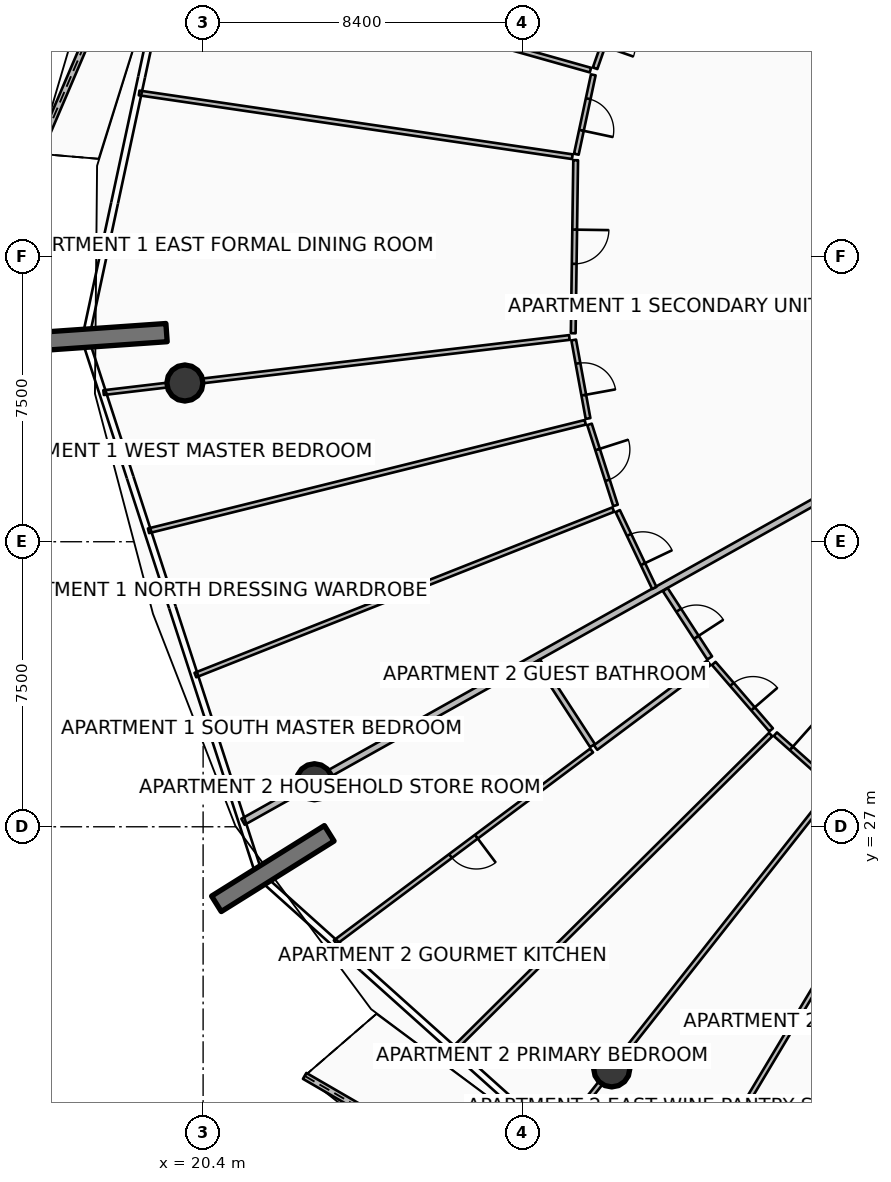
"""IFC4 building model, lengths in metres.
Left out: names, types, materials, properties, quantities, classifications, styles, units other than length and angle.
Written with IfcOpenShell. Run it as: python <this file> out.ifc"""

import sys

from ifc_helpers import new_model, si_unit, direction, frame, frame_2d, origin, origin_2d, place, context, subcontext, project, spatial, polyline, rectangle, circle, outline, extrude, element, fill, save


model = new_model("IFC4")
c1 = context("Model", 3, precision=1e-05, world=origin(), true_north=direction((0.0, 1.0)))
c2 = subcontext(c1, "Body", "Model", "MODEL_VIEW")
j1 = project(units=[si_unit("LENGTHUNIT", "METRE"), si_unit("PLANEANGLEUNIT", "RADIAN")], contexts=[c1])
p1 = place(None, origin())
s1 = spatial("IfcSite", under=j1, at=p1, CompositionType="ELEMENT")
p2 = place(p1, origin())
s2 = spatial("IfcBuilding", under=s1, at=p2, CompositionType="ELEMENT")
p3 = place(p2, frame((0.0, 0.0, 244.4)))
s3 = spatial("IfcBuildingStorey", under=s2, at=p3, CompositionType="ELEMENT", Elevation=244.4)
p4 = place(p3, frame((19.438, 40.003, 0.0), z_axis=(0.0, 0.0, 1.0), x_axis=(-0.997563824095, -0.069759707979, 0.0)))
e1 = element("IfcWall", 1, at=p4, inside=s3, PredefinedType="SOLIDWALL", context=c2, shape_type="SweptSolid", body=[
    extrude(rectangle(XDim=3.5, YDim=0.48, at=frame_2d((1.75, 0.0))), origin(), (0.0, 0.0, 1.0), 3.85),
])
p5 = place(p3, frame((23.719, 26.827, 0.0), z_axis=(0.0, 0.0, 1.0), x_axis=(-0.848033572426, -0.529942506352, 0.0)))
e2 = element("IfcWall", 2, at=p5, inside=s3, PredefinedType="SOLIDWALL", context=c2, shape_type="SweptSolid", body=[
    extrude(rectangle(XDim=3.5, YDim=0.48, at=frame_2d((1.75, 0.0))), origin(), (0.0, 0.0, 1.0), 3.85),
])
for number, where, z_axis, x_axis in (
    (3, (19.92, 38.677, 0.0), (0.0, 0.0, 1.0), (1.0, 0.0, 0.0)),
    (4, (23.33, 28.184, 0.0), (0.0, 0.0, 1.0), (1.0, 0.0, 0.0)),
    (5, (31.153, 20.629, 0.0), (0.0, 0.0, 1.0), (1.0, 0.0, 0.0)),
):
    element("IfcColumn", number, at=place(p3, frame(where, z_axis=z_axis, x_axis=x_axis)), inside=s3, PredefinedType="COLUMN", context=c2, shape_type="SweptSolid", body=[
        extrude(circle(Radius=0.475, at=origin_2d()), origin(), (0.0, 0.0, 1.0), 3.59),
    ])
p6 = place(p3, frame((20.765, 55.742, 0.0), z_axis=(0.0, 0.0, 1.0), x_axis=(-0.392715313702, -0.919660090677, 0.0)))
e6 = element("IfcWall", 6, at=p6, inside=s3, PredefinedType="PARAPET", context=c2, shape_type="SweptSolid", body=[
    extrude(outline(polyline([(0.0, 0.0), (11.995, 0.0), (11.995, 1.12), (5.998, 1.182), (0.0, 1.348), (0.0, 0.0)])), frame((0.0, 0.09, 0.0), z_axis=(0.0, -1.0, 0.0), x_axis=(1.0, 0.0, 0.0)), (0.0, 0.0, 1.0), 0.18),
])
p7 = place(p3, frame((23.073, 20.445, 0.0), z_axis=(0.0, 0.0, 1.0), x_axis=(0.865262565506, -0.501318953097, 0.0)))
e7 = element("IfcWall", 7, at=p7, inside=s3, PredefinedType="PARAPET", context=c2, shape_type="SweptSolid", body=[
    extrude(outline(polyline([(0.0, 0.0), (12.323, 0.0), (12.323, 1.832), (6.162, 1.853), (0.0, 1.756), (0.0, 0.0)])), frame((0.0, 0.09, 0.0), z_axis=(0.0, -1.0, 0.0), x_axis=(1.0, 0.0, 0.0)), (0.0, 0.0, 1.0), 0.18),
])
p8 = place(p3, frame((37.054, 35.87, 0.0), z_axis=(0.0, 0.0, 1.0), x_axis=(-0.872490186067, -0.488631635506, 0.0)))
e8 = element("IfcWall", 8, at=p8, inside=s3, PredefinedType="PARTITIONING", context=c2, shape_type="SweptSolid", body=[
    extrude(rectangle(XDim=17.884, YDim=0.18, at=frame_2d((8.942, 0.0))), origin(), (0.0, 0.0, 1.0), 2.957),
])
p9 = place(p3, frame((31.41, 48.938, 0.0), z_axis=(0.0, 0.0, 1.0), x_axis=(-0.331438416753, -0.943476854989, 0.0)))
e9 = element("IfcWall", 9, at=p9, inside=s3, PredefinedType="PARTITIONING", context=c2, shape_type="SweptSolid", body=[
    extrude(rectangle(XDim=2.099, YDim=0.125, at=frame_2d((1.049, 0.0))), origin(), (0.0, 0.0, 1.0), 2.957),
])
p10 = place(p9, frame((0.625, 0.0, 0.0)))
e10 = element("IfcOpeningElement", 10, at=p10, cuts=e9, PredefinedType="OPENING", context=c2, shape_type="SweptSolid", body=[
    extrude(rectangle(XDim=0.85, YDim=2.06, at=frame_2d((0.425, 1.03))), frame((0.0, 0.073, 0.0), z_axis=(0.0, -1.0, 0.0), x_axis=(1.0, 0.0, 0.0)), (0.0, 0.0, 1.0), 0.145),
])
p11 = place(p3, frame((30.592, 46.909, 0.0), z_axis=(0.0, 0.0, 1.0), x_axis=(-0.96245110957, 0.271455082266, 0.0)))
e11 = element("IfcWall", 11, at=p11, inside=s3, PredefinedType="PARTITIONING", context=c2, shape_type="SweptSolid", body=[
    extrude(rectangle(XDim=11.409, YDim=0.125, at=frame_2d((5.704, 0.0))), origin(), (0.0, 0.0, 1.0), 2.957),
])
p12 = place(p3, frame((30.115, 44.631, 0.0), z_axis=(0.0, 0.0, 1.0), x_axis=(-0.989347020715, 0.145576346298, 0.0)))
e12 = element("IfcWall", 12, at=p12, inside=s3, PredefinedType="PARTITIONING", context=c2, shape_type="SweptSolid", body=[
    extrude(rectangle(XDim=11.521, YDim=0.125, at=frame_2d((5.761, 0.0))), origin(), (0.0, 0.0, 1.0), 3.03),
])
p13 = place(p3, frame((30.667, 46.785, 0.0), z_axis=(0.0, 0.0, 1.0), x_axis=(-0.209005902588, -0.977914379014, 0.0)))
e13 = element("IfcWall", 13, at=p13, inside=s3, PredefinedType="PARTITIONING", context=c2, shape_type="SweptSolid", body=[
    extrude(rectangle(XDim=2.135, YDim=0.125, at=frame_2d((1.068, 0.0))), origin(), (0.0, 0.0, 1.0), 2.957),
])
p14 = place(p13, frame((0.643, 0.0, 0.0)))
e14 = element("IfcOpeningElement", 14, at=p14, cuts=e13, PredefinedType="OPENING", context=c2, shape_type="SweptSolid", body=[
    extrude(rectangle(XDim=0.85, YDim=2.06, at=frame_2d((0.425, 1.03))), frame((0.0, 0.073, 0.0), z_axis=(0.0, -1.0, 0.0), x_axis=(1.0, 0.0, 0.0)), (0.0, 0.0, 1.0), 0.145),
])
p15 = place(p3, frame((30.204, 44.538, 0.0), z_axis=(0.0, 0.0, 1.0), x_axis=(-0.014156354672, -0.999899793791, 0.0)))
e15 = element("IfcWall", 15, at=p15, inside=s3, PredefinedType="PARTITIONING", context=c2, shape_type="SweptSolid", body=[
    extrude(rectangle(XDim=4.553, YDim=0.125, at=frame_2d((2.276, 0.0))), origin(), (0.0, 0.0, 1.0), 2.957),
])
p16 = place(p15, frame((1.826, 0.0, 0.0)))
e16 = element("IfcOpeningElement", 16, at=p16, cuts=e15, PredefinedType="OPENING", context=c2, shape_type="SweptSolid", body=[
    extrude(rectangle(XDim=0.9, YDim=2.08, at=frame_2d((0.45, 1.04))), frame((0.0, 0.073, 0.0), z_axis=(0.0, -1.0, 0.0), x_axis=(1.0, 0.0, 0.0)), (0.0, 0.0, 1.0), 0.145),
])
p17 = place(p3, frame((30.038, 39.874, 0.0), z_axis=(0.0, 0.0, 1.0), x_axis=(-0.993068810962, -0.117534406428, 0.0)))
e17 = element("IfcWall", 17, at=p17, inside=s3, PredefinedType="PARTITIONING", context=c2, shape_type="SweptSolid", body=[
    extrude(rectangle(XDim=12.343, YDim=0.125, at=frame_2d((6.171, 0.0))), origin(), (0.0, 0.0, 1.0), 2.957),
])
p18 = place(p3, frame((30.456, 37.642, 0.0), z_axis=(0.0, 0.0, 1.0), x_axis=(-0.970505215381, -0.241080125513, 0.0)))
e18 = element("IfcWall", 18, at=p18, inside=s3, PredefinedType="PARTITIONING", context=c2, shape_type="SweptSolid", body=[
    extrude(rectangle(XDim=11.843, YDim=0.125, at=frame_2d((5.921, 0.0))), origin(), (0.0, 0.0, 1.0), 3.03),
])
p19 = place(p3, frame((31.192, 35.345, 0.0), z_axis=(0.0, 0.0, 1.0), x_axis=(-0.929773642051, -0.368131735317, 0.0)))
e19 = element("IfcWall", 19, at=p19, inside=s3, PredefinedType="PARTITIONING", context=c2, shape_type="SweptSolid", body=[
    extrude(rectangle(XDim=11.827, YDim=0.125, at=frame_2d((5.913, 0.0))), origin(), (0.0, 0.0, 1.0), 3.03),
])
p20 = place(p3, frame((30.152, 39.807, 0.0), z_axis=(0.0, 0.0, 1.0), x_axis=(0.179601937348, -0.983739367973, 0.0)))
e20 = element("IfcWall", 20, at=p20, inside=s3, PredefinedType="PARTITIONING", context=c2, shape_type="SweptSolid", body=[
    extrude(rectangle(XDim=2.099, YDim=0.125, at=frame_2d((1.049, 0.0))), origin(), (0.0, 0.0, 1.0), 2.957),
])
p21 = place(p20, frame((0.625, 0.0, 0.0)))
e21 = element("IfcOpeningElement", 21, at=p21, cuts=e20, PredefinedType="OPENING", context=c2, shape_type="SweptSolid", body=[
    extrude(rectangle(XDim=0.85, YDim=2.06, at=frame_2d((0.425, 1.03))), frame((0.0, 0.073, 0.0), z_axis=(0.0, -1.0, 0.0), x_axis=(1.0, 0.0, 0.0)), (0.0, 0.0, 1.0), 0.145),
])
p22 = place(p3, frame((30.568, 37.588, 0.0), z_axis=(0.0, 0.0, 1.0), x_axis=(0.305285840617, -0.952260760254, 0.0)))
e22 = element("IfcWall", 22, at=p22, inside=s3, PredefinedType="PARTITIONING", context=c2, shape_type="SweptSolid", body=[
    extrude(rectangle(XDim=2.24, YDim=0.125, at=frame_2d((1.12, 0.0))), origin(), (0.0, 0.0, 1.0), 3.03),
])
p23 = place(p22, frame((0.695, 0.0, 0.0)))
e23 = element("IfcOpeningElement", 23, at=p23, cuts=e22, PredefinedType="OPENING", context=c2, shape_type="SweptSolid", body=[
    extrude(rectangle(XDim=0.85, YDim=2.06, at=frame_2d((0.425, 1.03))), frame((0.0, 0.073, 0.0), z_axis=(0.0, -1.0, 0.0), x_axis=(1.0, 0.0, 0.0)), (0.0, 0.0, 1.0), 0.145),
])
p24 = place(p3, frame((31.31, 35.306, 0.0), z_axis=(0.0, 0.0, 1.0), x_axis=(0.429468098594, -0.903082029657, 0.0)))
e24 = element("IfcWall", 24, at=p24, inside=s3, PredefinedType="PARTITIONING", context=c2, shape_type="SweptSolid", body=[
    extrude(rectangle(XDim=2.24, YDim=0.125, at=frame_2d((1.12, 0.0))), origin(), (0.0, 0.0, 1.0), 2.957),
])
p25 = place(p24, frame((0.695, 0.0, 0.0)))
e25 = element("IfcOpeningElement", 25, at=p25, cuts=e24, PredefinedType="OPENING", context=c2, shape_type="SweptSolid", body=[
    extrude(rectangle(XDim=0.85, YDim=2.06, at=frame_2d((0.425, 1.03))), frame((0.0, 0.073, 0.0), z_axis=(0.0, -1.0, 0.0), x_axis=(1.0, 0.0, 0.0)), (0.0, 0.0, 1.0), 0.145),
])
p26 = place(p3, frame((32.562, 33.24, 0.0), z_axis=(0.0, 0.0, 1.0), x_axis=(0.544888302375, -0.838508639154, 0.0)))
e26 = element("IfcWall", 26, at=p26, inside=s3, PredefinedType="PARTITIONING", context=c2, shape_type="SweptSolid", body=[
    extrude(rectangle(XDim=2.144, YDim=0.15, at=frame_2d((1.072, 0.0))), origin(), (0.0, 0.0, 1.0), 2.957),
])
p27 = place(p26, frame((0.647, 0.0, 0.0)))
e27 = element("IfcOpeningElement", 27, at=p27, cuts=e26, PredefinedType="OPENING", context=c2, shape_type="SweptSolid", body=[
    extrude(rectangle(XDim=0.85, YDim=2.06, at=frame_2d((0.425, 1.03))), frame((0.0, 0.085, 0.0), z_axis=(0.0, -1.0, 0.0), x_axis=(1.0, 0.0, 0.0)), (0.0, 0.0, 1.0), 0.17),
])
p28 = place(p3, frame((29.202, 31.359, 0.0), z_axis=(0.0, 0.0, 1.0), x_axis=(0.544926834082, -0.838483598825, 0.0)))
e28 = element("IfcWall", 28, at=p28, inside=s3, PredefinedType="PARTITIONING", context=c2, shape_type="SweptSolid", body=[
    extrude(rectangle(XDim=2.651, YDim=0.15, at=frame_2d((1.325, 0.0))), origin(), (0.0, 0.0, 1.0), 2.957),
])
p29 = place(p3, frame((33.707, 31.312, 0.0), z_axis=(0.0, 0.0, 1.0), x_axis=(-0.800889069655, -0.598812740435, 0.0)))
e29 = element("IfcWall", 29, at=p29, inside=s3, PredefinedType="PARTITIONING", context=c2, shape_type="SweptSolid", body=[
    extrude(rectangle(XDim=3.72, YDim=0.15, at=frame_2d((1.86, 0.0))), origin(), (0.0, 0.0, 1.0), 3.03),
])
p30 = place(p3, frame((30.624, 29.007, 0.0), z_axis=(0.0, 0.0, 1.0), x_axis=(-0.800861586428, -0.598849496437, 0.0)))
e30 = element("IfcWall", 30, at=p30, inside=s3, PredefinedType="PARTITIONING", context=c2, shape_type="SweptSolid", body=[
    extrude(rectangle(XDim=8.425, YDim=0.125, at=frame_2d((4.212, 0.0))), origin(), (0.0, 0.0, 1.0), 3.03),
])
p31 = place(p30, frame((3.787, 0.0, 0.0)))
e31 = element("IfcOpeningElement", 31, at=p31, cuts=e30, PredefinedType="OPENING", context=c2, shape_type="SweptSolid", body=[
    extrude(rectangle(XDim=0.85, YDim=2.06, at=frame_2d((0.425, 1.03))), frame((0.0, 0.073, 0.0), z_axis=(0.0, -1.0, 0.0), x_axis=(1.0, 0.0, 0.0)), (0.0, 0.0, 1.0), 0.145),
])
p32 = place(p3, frame((35.335, 29.426, 0.0), z_axis=(0.0, 0.0, 1.0), x_axis=(-0.709660425086, -0.704543881576, 0.0)))
e32 = element("IfcWall", 32, at=p32, inside=s3, PredefinedType="PARTITIONING", context=c2, shape_type="SweptSolid", body=[
    extrude(rectangle(XDim=11.738, YDim=0.125, at=frame_2d((5.869, 0.0))), origin(), (0.0, 0.0, 1.0), 3.03),
])
p33 = place(p3, frame((33.838, 31.298, 0.0), z_axis=(0.0, 0.0, 1.0), x_axis=(0.653278423857, -0.757117758954, 0.0)))
e33 = element("IfcWall", 33, at=p33, inside=s3, PredefinedType="PARTITIONING", context=c2, shape_type="SweptSolid", body=[
    extrude(rectangle(XDim=2.309, YDim=0.125, at=frame_2d((1.154, 0.0))), origin(), (0.0, 0.0, 1.0), 3.03),
])
p34 = place(p33, frame((0.729, 0.0, 0.0)))
e34 = element("IfcOpeningElement", 34, at=p34, cuts=e33, PredefinedType="OPENING", context=c2, shape_type="SweptSolid", body=[
    extrude(rectangle(XDim=0.85, YDim=2.06, at=frame_2d((0.425, 1.03))), frame((0.0, 0.073, 0.0), z_axis=(0.0, -1.0, 0.0), x_axis=(1.0, 0.0, 0.0)), (0.0, 0.0, 1.0), 0.145),
])
p35 = place(p3, frame((35.458, 29.436, 0.0), z_axis=(0.0, 0.0, 1.0), x_axis=(0.746255603185, -0.665659503586, 0.0)))
e35 = element("IfcWall", 35, at=p35, inside=s3, PredefinedType="PARTITIONING", context=c2, shape_type="SweptSolid", body=[
    extrude(rectangle(XDim=1.975, YDim=0.125, at=frame_2d((0.988, 0.0))), origin(), (0.0, 0.0, 1.0), 2.957),
])
p36 = place(p35, frame((0.562, 0.0, 0.0)))
e36 = element("IfcOpeningElement", 36, at=p36, cuts=e35, PredefinedType="OPENING", context=c2, shape_type="SweptSolid", body=[
    extrude(rectangle(XDim=0.85, YDim=2.06, at=frame_2d((0.425, 1.03))), frame((0.0, 0.073, 0.0), z_axis=(0.0, -1.0, 0.0), x_axis=(1.0, 0.0, 0.0)), (0.0, 0.0, 1.0), 0.145),
])
p37 = place(p3, frame((36.945, 27.977, 0.0), z_axis=(0.0, 0.0, 1.0), x_axis=(-0.619096573209, -0.785314862358, 0.0)))
e37 = element("IfcWall", 37, at=p37, inside=s3, PredefinedType="PARTITIONING", context=c2, shape_type="SweptSolid", body=[
    extrude(rectangle(XDim=11.739, YDim=0.125, at=frame_2d((5.869, 0.0))), origin(), (0.0, 0.0, 1.0), 2.957),
])
p38 = place(p3, frame((38.843, 26.681, 0.0), z_axis=(0.0, 0.0, 1.0), x_axis=(-0.513080899873, -0.858340253154, 0.0)))
e38 = element("IfcWall", 38, at=p38, inside=s3, PredefinedType="PARTITIONING", context=c2, shape_type="SweptSolid", body=[
    extrude(rectangle(XDim=10.282, YDim=0.125, at=frame_2d((5.141, 0.0))), origin(), (0.0, 0.0, 1.0), 3.03),
])
p39 = place(p14, origin())
e39 = element("IfcDoor", 39, at=p39, inside=s3, OperationType="SINGLE_SWING_RIGHT", PredefinedType="DOOR", context=c2, shape_type="SweptSolid", body=[
    extrude(rectangle(XDim=0.85, YDim=2.06, at=frame_2d((0.425, 1.03))), frame((0.0, 0.025, 0.0), z_axis=(0.0, -1.0, 0.0), x_axis=(1.0, 0.0, 0.0)), (0.0, 0.0, 1.0), 0.05),
])
fill(e14, e39)
p40 = place(p16, origin())
e40 = element("IfcDoor", 40, at=p40, inside=s3, OperationType="SINGLE_SWING_LEFT", PredefinedType="DOOR", context=c2, shape_type="SweptSolid", body=[
    extrude(rectangle(XDim=0.9, YDim=2.08, at=frame_2d((0.45, 1.04))), frame((0.0, 0.025, 0.0), z_axis=(0.0, -1.0, 0.0), x_axis=(1.0, 0.0, 0.0)), (0.0, 0.0, 1.0), 0.05),
])
fill(e16, e40)
p41 = place(p21, origin())
e41 = element("IfcDoor", 41, at=p41, inside=s3, OperationType="SINGLE_SWING_RIGHT", PredefinedType="DOOR", context=c2, shape_type="SweptSolid", body=[
    extrude(rectangle(XDim=0.85, YDim=2.06, at=frame_2d((0.425, 1.03))), frame((0.0, 0.025, 0.0), z_axis=(0.0, -1.0, 0.0), x_axis=(1.0, 0.0, 0.0)), (0.0, 0.0, 1.0), 0.05),
])
fill(e21, e41)
p42 = place(p23, origin())
e42 = element("IfcDoor", 42, at=p42, inside=s3, OperationType="SINGLE_SWING_LEFT", PredefinedType="DOOR", context=c2, shape_type="SweptSolid", body=[
    extrude(rectangle(XDim=0.85, YDim=2.06, at=frame_2d((0.425, 1.03))), frame((0.0, 0.025, 0.0), z_axis=(0.0, -1.0, 0.0), x_axis=(1.0, 0.0, 0.0)), (0.0, 0.0, 1.0), 0.05),
])
fill(e23, e42)
p43 = place(p25, origin())
e43 = element("IfcDoor", 43, at=p43, inside=s3, OperationType="SINGLE_SWING_RIGHT", PredefinedType="DOOR", context=c2, shape_type="SweptSolid", body=[
    extrude(rectangle(XDim=0.85, YDim=2.06, at=frame_2d((0.425, 1.03))), frame((0.0, 0.025, 0.0), z_axis=(0.0, -1.0, 0.0), x_axis=(1.0, 0.0, 0.0)), (0.0, 0.0, 1.0), 0.05),
])
fill(e25, e43)
p44 = place(p27, origin())
e44 = element("IfcDoor", 44, at=p44, inside=s3, OperationType="SINGLE_SWING_RIGHT", PredefinedType="DOOR", context=c2, shape_type="SweptSolid", body=[
    extrude(rectangle(XDim=0.85, YDim=2.06, at=frame_2d((0.425, 1.03))), frame((0.0, 0.025, 0.0), z_axis=(0.0, -1.0, 0.0), x_axis=(1.0, 0.0, 0.0)), (0.0, 0.0, 1.0), 0.05),
])
fill(e27, e44)
p45 = place(p31, origin())
e45 = element("IfcDoor", 45, at=p45, inside=s3, OperationType="SINGLE_SWING_LEFT", PredefinedType="DOOR", context=c2, shape_type="SweptSolid", body=[
    extrude(rectangle(XDim=0.85, YDim=2.06, at=frame_2d((0.425, 1.03))), frame((0.0, 0.025, 0.0), z_axis=(0.0, -1.0, 0.0), x_axis=(1.0, 0.0, 0.0)), (0.0, 0.0, 1.0), 0.05),
])
fill(e31, e45)
p46 = place(p34, origin())
e46 = element("IfcDoor", 46, at=p46, inside=s3, OperationType="SINGLE_SWING_RIGHT", PredefinedType="DOOR", context=c2, shape_type="SweptSolid", body=[
    extrude(rectangle(XDim=0.85, YDim=2.06, at=frame_2d((0.425, 1.03))), frame((0.0, 0.025, 0.0), z_axis=(0.0, -1.0, 0.0), x_axis=(1.0, 0.0, 0.0)), (0.0, 0.0, 1.0), 0.05),
])
fill(e34, e46)
p47 = place(p36, origin())
e47 = element("IfcDoor", 47, at=p47, inside=s3, OperationType="SINGLE_SWING_LEFT", PredefinedType="DOOR", context=c2, shape_type="SweptSolid", body=[
    extrude(rectangle(XDim=0.85, YDim=2.06, at=frame_2d((0.425, 1.03))), frame((0.0, 0.025, 0.0), z_axis=(0.0, -1.0, 0.0), x_axis=(1.0, 0.0, 0.0)), (0.0, 0.0, 1.0), 0.05),
])
fill(e36, e47)
save(model, sys.argv[1])
